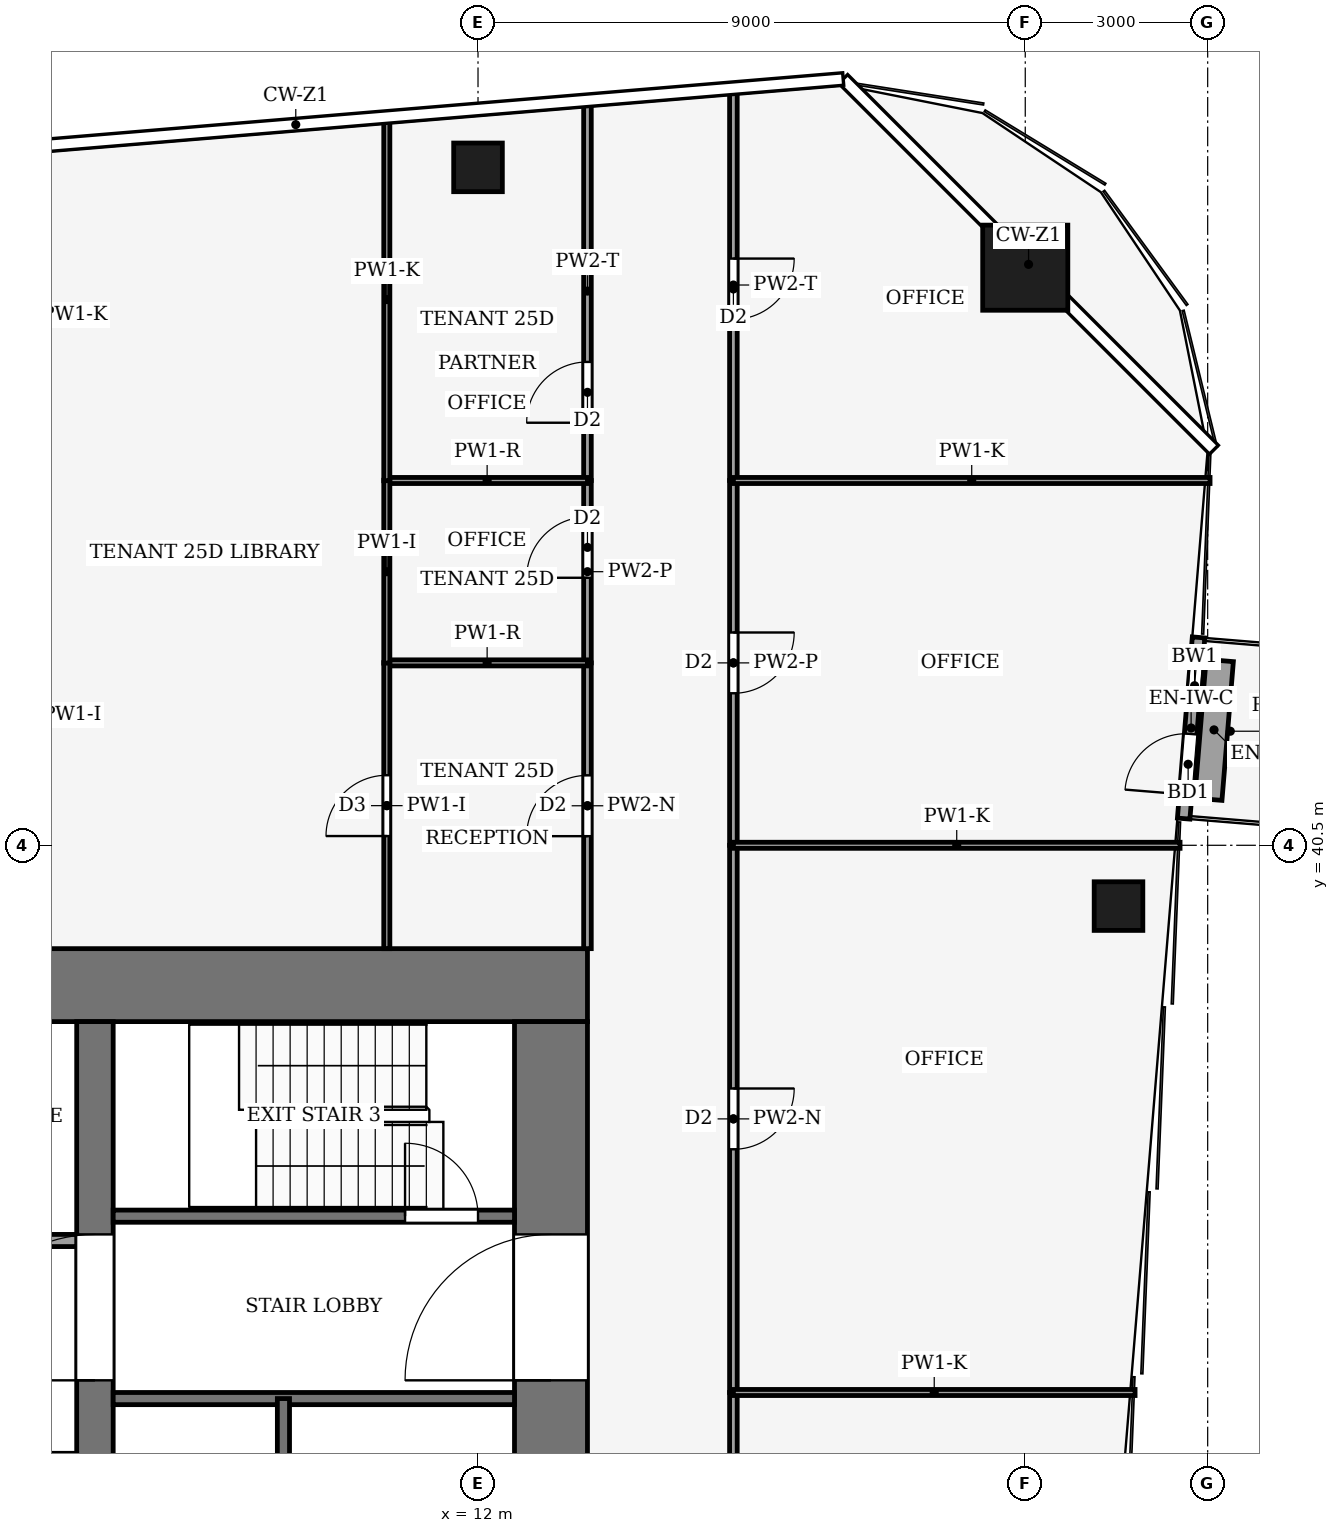
"""IFC4 building model, lengths in metres.
Left out: names, types, materials, properties, quantities, classifications, styles, units other than length and angle.
Written with IfcOpenShell. Run it as: python <this file> out.ifc"""

import sys

from ifc_helpers import new_model, si_unit, direction, frame, frame_2d, origin, origin_2d, place, context, subcontext, project, spatial, rectangle, hollow_rectangle, extrude, element, fill, save


model = new_model("IFC4")
c1 = context("Model", 3, precision=1e-05, world=origin(), true_north=direction((0.0, 1.0)))
c2 = subcontext(c1, "Body", "Model", "MODEL_VIEW")
j1 = project(units=[si_unit("LENGTHUNIT", "METRE"), si_unit("PLANEANGLEUNIT", "RADIAN")], contexts=[c1])
p1 = place(None, origin())
s1 = spatial("IfcSite", under=j1, at=p1, CompositionType="ELEMENT")
p2 = place(p1, origin())
s2 = spatial("IfcBuilding", under=s1, at=p2, CompositionType="ELEMENT")
p3 = place(p2, frame((0.0, 0.0, 110.0)))
s3 = spatial("IfcBuildingStorey", under=s2, at=p3, CompositionType="ELEMENT", Elevation=110.0)
p4 = place(p3, frame((-13.8, 38.2, -0.13), z_axis=(0.0, 0.0, 1.0), x_axis=(1.0, 0.0, 0.0)))
e1 = element("IfcWall", 1, at=p4, inside=s3, PredefinedType="SHEAR", context=c2, shape_type="SweptSolid", body=[
    extrude(rectangle(XDim=27.6, YDim=1.2, at=frame_2d((13.8, 0.0))), origin(), (0.0, 0.0, 1.0), 3.88),
])
p5 = place(p3, frame((13.2, 18.4, -0.13), z_axis=(0.0, 0.0, 1.0), x_axis=(0.0, 1.0, 0.0)))
e2 = element("IfcWall", 2, at=p5, inside=s3, PredefinedType="SHEAR", context=c2, shape_type="SweptSolid", body=[
    extrude(rectangle(XDim=19.2, YDim=1.2, at=frame_2d((9.6, 0.0))), origin(), (0.0, 0.0, 1.0), 3.88),
])
p6 = place(p5, frame((2.8, 0.0, 0.13)))
e3 = element("IfcOpeningElement", 3, at=p6, cuts=e2, PredefinedType="OPENING", context=c2, shape_type="SweptSolid", body=[
    extrude(rectangle(XDim=2.4, YDim=2.4, at=frame_2d((1.2, 1.2))), frame((0.0, 0.61, 0.0), z_axis=(0.0, -1.0, 0.0), x_axis=(1.0, 0.0, 0.0)), (0.0, 0.0, 1.0), 1.22),
])
p7 = place(p5, frame((13.3, 0.0, 0.13)))
e4 = element("IfcOpeningElement", 4, at=p7, cuts=e2, PredefinedType="OPENING", context=c2, shape_type="SweptSolid", body=[
    extrude(rectangle(XDim=2.4, YDim=2.4, at=frame_2d((1.2, 1.2))), frame((0.0, 0.61, 0.0), z_axis=(0.0, -1.0, 0.0), x_axis=(1.0, 0.0, 0.0)), (0.0, 0.0, 1.0), 1.22),
])
p8 = place(p3, frame((5.7, 18.4, -0.13), z_axis=(0.0, 0.0, 1.0), x_axis=(0.0, 1.0, 0.0)))
e5 = element("IfcWall", 5, at=p8, inside=s3, PredefinedType="SHEAR", context=c2, shape_type="SweptSolid", body=[
    extrude(rectangle(XDim=19.2, YDim=0.6, at=frame_2d((9.6, 0.0))), origin(), (0.0, 0.0, 1.0), 3.88),
])
p9 = place(p8, frame((8.35, 0.0, 0.13)))
e6 = element("IfcOpeningElement", 6, at=p9, cuts=e5, PredefinedType="OPENING", context=c2, shape_type="SweptSolid", body=[
    extrude(rectangle(XDim=0.9, YDim=2.1, at=frame_2d((0.45, 1.05))), frame((0.0, 0.31, 0.0), z_axis=(0.0, -1.0, 0.0), x_axis=(1.0, 0.0, 0.0)), (0.0, 0.0, 1.0), 0.62),
])
p10 = place(p8, frame((13.3, 0.0, 0.13)))
e7 = element("IfcOpeningElement", 7, at=p10, cuts=e5, PredefinedType="OPENING", context=c2, shape_type="SweptSolid", body=[
    extrude(rectangle(XDim=2.4, YDim=2.4, at=frame_2d((1.2, 1.2))), frame((0.0, 0.31, 0.0), z_axis=(0.0, -1.0, 0.0), x_axis=(1.0, 0.0, 0.0)), (0.0, 0.0, 1.0), 0.62),
])
p11 = place(p3, frame((21.0, 50.0, 0.0), z_axis=(0.0, 0.0, 1.0), x_axis=(1.0, 0.0, 0.0)))
e8 = element("IfcColumn", 8, at=p11, inside=s3, PredefinedType="COLUMN", context=c2, shape_type="SweptSolid", body=[
    extrude(hollow_rectangle(XDim=1.4, YDim=1.4, WallThickness=0.08, at=origin_2d()), origin(), (0.0, 0.0, 1.0), 4.0),
])
for number, where, z_axis, x_axis in (
    (9, (12.0, 51.65, 0.0), (0.0, 0.0, 1.0), (1.0, 0.0, 0.0)),
    (10, (22.534, 39.5, 0.0), (0.0, 0.0, 1.0), (1.0, 0.0, 0.0)),
):
    element("IfcColumn", number, at=place(p3, frame(where, z_axis=z_axis, x_axis=x_axis)), inside=s3, PredefinedType="COLUMN", context=c2, shape_type="SweptSolid", body=[
        extrude(hollow_rectangle(XDim=0.8, YDim=0.8, WallThickness=0.04, at=origin_2d()), origin(), (0.0, 0.0, 1.0), 4.0),
    ])
p12 = place(p3, frame((23.605, 40.939, 0.0), z_axis=(0.0, 0.0, 1.0), x_axis=(0.081903334605, 0.996640278024, 0.0)))
e11 = element("IfcWall", 11, at=p12, inside=s3, PredefinedType="SOLIDWALL", context=c2, shape_type="SweptSolid", body=[
    extrude(rectangle(XDim=2.99, YDim=0.206, at=frame_2d((1.495, 0.0))), origin(), (0.0, 0.0, 1.0), 3.65),
])
p13 = place(p12, frame((0.396, 0.0, 0.0)))
e12 = element("IfcOpeningElement", 12, at=p13, cuts=e11, PredefinedType="OPENING", context=c2, shape_type="SweptSolid", body=[
    extrude(rectangle(XDim=1.0, YDim=2.1, at=frame_2d((0.5, 1.05))), frame((0.0, 0.113, 0.0), z_axis=(0.0, -1.0, 0.0), x_axis=(1.0, 0.0, 0.0)), (0.0, 0.0, 1.0), 0.226),
])
p14 = place(p12, frame((1.793, 0.0, 0.9)))
e13 = element("IfcOpeningElement", 13, at=p14, cuts=e11, PredefinedType="OPENING", context=c2, shape_type="SweptSolid", body=[
    extrude(rectangle(XDim=0.8, YDim=1.2, at=frame_2d((0.4, 0.6))), frame((0.0, 0.113, 0.0), z_axis=(0.0, -1.0, 0.0), x_axis=(1.0, 0.0, 0.0)), (0.0, 0.0, 1.0), 0.226),
])
p15 = place(p3, frame((24.01, 41.257, 0.0), z_axis=(0.0, 0.0, 1.0), x_axis=(0.081986639556, 0.996633428566, 0.0)))
e14 = element("IfcWall", 14, at=p15, inside=s3, PredefinedType="USERDEFINED", context=c2, shape_type="SweptSolid", body=[
    extrude(rectangle(XDim=2.29, YDim=0.45, at=frame_2d((1.145, 0.0))), origin(), (0.0, 0.0, 1.0), 0.4),
])
p16 = place(p3, frame((6.0, 31.4, 0.0), z_axis=(0.0, 0.0, 1.0), x_axis=(1.0, 0.0, 0.0)))
e15 = element("IfcWall", 15, at=p16, inside=s3, PredefinedType="PARTITIONING", context=c2, shape_type="SweptSolid", body=[
    extrude(rectangle(XDim=6.6, YDim=0.2, at=frame_2d((3.3, 0.0))), origin(), (0.0, 0.0, 1.0), 3.75),
])
p17 = place(p3, frame((-5.4, 34.0, 0.0), z_axis=(0.0, 0.0, 1.0), x_axis=(1.0, 0.0, 0.0)))
e16 = element("IfcWall", 16, at=p17, inside=s3, PredefinedType="PARTITIONING", context=c2, shape_type="SweptSolid", body=[
    extrude(rectangle(XDim=10.8, YDim=0.2, at=frame_2d((5.4, 0.0))), origin(), (0.0, 0.0, 1.0), 3.75),
])
p18 = place(p17, frame((6.15, 0.0, 0.0)))
e17 = element("IfcOpeningElement", 17, at=p18, cuts=e16, PredefinedType="OPENING", context=c2, shape_type="SweptSolid", body=[
    extrude(rectangle(XDim=1.2, YDim=2.2, at=frame_2d((0.6, 1.1))), frame((0.0, 0.11, 0.0), z_axis=(0.0, -1.0, 0.0), x_axis=(1.0, 0.0, 0.0)), (0.0, 0.0, 1.0), 0.22),
])
p19 = place(p17, frame((8.95, 0.0, 0.0)))
e18 = element("IfcOpeningElement", 18, at=p19, cuts=e16, PredefinedType="OPENING", context=c2, shape_type="SweptSolid", body=[
    extrude(rectangle(XDim=1.0, YDim=2.1, at=frame_2d((0.5, 1.05))), frame((0.0, 0.11, 0.0), z_axis=(0.0, -1.0, 0.0), x_axis=(1.0, 0.0, 0.0)), (0.0, 0.0, 1.0), 0.22),
])
p20 = place(p3, frame((6.0, 34.4, 0.0), z_axis=(0.0, 0.0, 1.0), x_axis=(1.0, 0.0, 0.0)))
e19 = element("IfcWall", 19, at=p20, inside=s3, PredefinedType="PARTITIONING", context=c2, shape_type="SweptSolid", body=[
    extrude(rectangle(XDim=6.6, YDim=0.2, at=frame_2d((3.3, 0.0))), origin(), (0.0, 0.0, 1.0), 3.75),
])
p21 = place(p20, frame((4.8, 0.0, 0.0)))
e20 = element("IfcOpeningElement", 20, at=p21, cuts=e19, PredefinedType="OPENING", context=c2, shape_type="SweptSolid", body=[
    extrude(rectangle(XDim=1.2, YDim=2.2, at=frame_2d((0.6, 1.1))), frame((0.0, 0.11, 0.0), z_axis=(0.0, -1.0, 0.0), x_axis=(1.0, 0.0, 0.0)), (0.0, 0.0, 1.0), 0.22),
])
p22 = place(p3, frame((8.8, 24.0, 0.0), z_axis=(0.0, 0.0, 1.0), x_axis=(0.0, 1.0, 0.0)))
e21 = element("IfcWall", 21, at=p22, inside=s3, PredefinedType="PARTITIONING", context=c2, shape_type="SweptSolid", body=[
    extrude(rectangle(XDim=7.4, YDim=0.2, at=frame_2d((3.7, 0.0))), origin(), (0.0, 0.0, 1.0), 3.75),
])
p23 = place(p3, frame((16.2, 31.5, 0.0), z_axis=(0.0, 0.0, 1.0), x_axis=(0.0, -1.0, 0.0)))
e22 = element("IfcWall", 22, at=p23, inside=s3, PredefinedType="PARTITIONING", context=c2, shape_type="SweptSolid", body=[
    extrude(rectangle(XDim=9.0, YDim=0.125, at=frame_2d((4.5, 0.0))), origin(), (0.0, 0.0, 1.0), 3.36),
])
p24 = place(p23, frame((4.0, 0.0, 0.0)))
e23 = element("IfcOpeningElement", 23, at=p24, cuts=e22, PredefinedType="OPENING", context=c2, shape_type="SweptSolid", body=[
    extrude(rectangle(XDim=1.0, YDim=2.1, at=frame_2d((0.5, 1.05))), frame((0.0, 0.073, 0.0), z_axis=(0.0, -1.0, 0.0), x_axis=(1.0, 0.0, 0.0)), (0.0, 0.0, 1.0), 0.145),
])
p25 = place(p3, frame((16.2, 40.5, 0.0), z_axis=(0.0, 0.0, 1.0), x_axis=(0.0, -1.0, 0.0)))
e24 = element("IfcWall", 24, at=p25, inside=s3, PredefinedType="PARTITIONING", context=c2, shape_type="SweptSolid", body=[
    extrude(rectangle(XDim=9.0, YDim=0.125, at=frame_2d((4.5, 0.0))), origin(), (0.0, 0.0, 1.0), 3.02),
])
p26 = place(p25, frame((4.0, 0.0, 0.0)))
e25 = element("IfcOpeningElement", 25, at=p26, cuts=e24, PredefinedType="OPENING", context=c2, shape_type="SweptSolid", body=[
    extrude(rectangle(XDim=1.0, YDim=2.1, at=frame_2d((0.5, 1.05))), frame((0.0, 0.073, 0.0), z_axis=(0.0, -1.0, 0.0), x_axis=(1.0, 0.0, 0.0)), (0.0, 0.0, 1.0), 0.145),
])
p27 = place(p3, frame((16.2, 46.5, 0.0), z_axis=(0.0, 0.0, 1.0), x_axis=(0.0, -1.0, 0.0)))
e26 = element("IfcWall", 26, at=p27, inside=s3, PredefinedType="PARTITIONING", context=c2, shape_type="SweptSolid", body=[
    extrude(rectangle(XDim=6.0, YDim=0.125, at=frame_2d((3.0, 0.0))), origin(), (0.0, 0.0, 1.0), 3.75),
])
p28 = place(p27, frame((2.5, 0.0, 0.0)))
e27 = element("IfcOpeningElement", 27, at=p28, cuts=e26, PredefinedType="OPENING", context=c2, shape_type="SweptSolid", body=[
    extrude(rectangle(XDim=1.0, YDim=2.1, at=frame_2d((0.5, 1.05))), frame((0.0, 0.073, 0.0), z_axis=(0.0, -1.0, 0.0), x_axis=(1.0, 0.0, 0.0)), (0.0, 0.0, 1.0), 0.145),
])
p29 = place(p3, frame((16.2, 52.93, 0.0), z_axis=(0.0, 0.0, 1.0), x_axis=(0.0, -1.0, 0.0)))
e28 = element("IfcWall", 28, at=p29, inside=s3, PredefinedType="PARTITIONING", context=c2, shape_type="SweptSolid", body=[
    extrude(rectangle(XDim=6.43, YDim=0.125, at=frame_2d((3.215, 0.0))), origin(), (0.0, 0.0, 1.0), 2.92),
])
p30 = place(p29, frame((2.78, 0.0, 0.0)))
e29 = element("IfcOpeningElement", 29, at=p30, cuts=e28, PredefinedType="OPENING", context=c2, shape_type="SweptSolid", body=[
    extrude(rectangle(XDim=1.0, YDim=2.1, at=frame_2d((0.5, 1.05))), frame((0.0, 0.073, 0.0), z_axis=(0.0, -1.0, 0.0), x_axis=(1.0, 0.0, 0.0)), (0.0, 0.0, 1.0), 0.145),
])
p31 = place(p3, frame((13.8, 38.8, 0.0), z_axis=(0.0, 0.0, 1.0), x_axis=(0.0, 1.0, 0.0)))
e30 = element("IfcWall", 30, at=p31, inside=s3, PredefinedType="PARTITIONING", context=c2, shape_type="SweptSolid", body=[
    extrude(rectangle(XDim=4.7, YDim=0.125, at=frame_2d((2.35, 0.0))), origin(), (0.0, 0.0, 1.0), 3.02),
])
p32 = place(p31, frame((1.85, 0.0, 0.0)))
e31 = element("IfcOpeningElement", 31, at=p32, cuts=e30, PredefinedType="OPENING", context=c2, shape_type="SweptSolid", body=[
    extrude(rectangle(XDim=1.0, YDim=2.1, at=frame_2d((0.5, 1.05))), frame((0.0, 0.073, 0.0), z_axis=(0.0, -1.0, 0.0), x_axis=(1.0, 0.0, 0.0)), (0.0, 0.0, 1.0), 0.145),
])
p33 = place(p3, frame((13.8, 43.5, 0.0), z_axis=(0.0, 0.0, 1.0), x_axis=(0.0, 1.0, 0.0)))
e32 = element("IfcWall", 32, at=p33, inside=s3, PredefinedType="PARTITIONING", context=c2, shape_type="SweptSolid", body=[
    extrude(rectangle(XDim=3.0, YDim=0.125, at=frame_2d((1.5, 0.0))), origin(), (0.0, 0.0, 1.0), 3.75),
])
p34 = place(p33, frame((1.4, 0.0, 0.0)))
e33 = element("IfcOpeningElement", 33, at=p34, cuts=e32, PredefinedType="OPENING", context=c2, shape_type="SweptSolid", body=[
    extrude(rectangle(XDim=1.0, YDim=2.1, at=frame_2d((0.5, 1.05))), frame((0.0, 0.073, 0.0), z_axis=(0.0, -1.0, 0.0), x_axis=(1.0, 0.0, 0.0)), (0.0, 0.0, 1.0), 0.145),
])
p35 = place(p3, frame((13.8, 46.5, 0.0), z_axis=(0.0, 0.0, 1.0), x_axis=(0.0, 1.0, 0.0)))
e34 = element("IfcWall", 34, at=p35, inside=s3, PredefinedType="PARTITIONING", context=c2, shape_type="SweptSolid", body=[
    extrude(rectangle(XDim=6.23, YDim=0.125, at=frame_2d((3.115, 0.0))), origin(), (0.0, 0.0, 1.0), 2.92),
])
p36 = place(p35, frame((0.95, 0.0, 0.0)))
e35 = element("IfcOpeningElement", 35, at=p36, cuts=e34, PredefinedType="OPENING", context=c2, shape_type="SweptSolid", body=[
    extrude(rectangle(XDim=1.0, YDim=2.1, at=frame_2d((0.5, 1.05))), frame((0.0, 0.073, 0.0), z_axis=(0.0, -1.0, 0.0), x_axis=(1.0, 0.0, 0.0)), (0.0, 0.0, 1.0), 0.145),
])
p37 = place(p3, frame((22.806, 31.5, 0.0), z_axis=(0.0, 0.0, 1.0), x_axis=(-1.0, 0.0, 0.0)))
e36 = element("IfcWall", 36, at=p37, inside=s3, PredefinedType="PARTITIONING", context=c2, shape_type="SweptSolid", body=[
    extrude(rectangle(XDim=6.606, YDim=0.1, at=frame_2d((3.303, 0.0))), origin(), (0.0, 0.0, 1.0), 2.92),
])
p38 = place(p3, frame((23.546, 40.5, 0.0), z_axis=(0.0, 0.0, 1.0), x_axis=(-1.0, 0.0, 0.0)))
e37 = element("IfcWall", 37, at=p38, inside=s3, PredefinedType="PARTITIONING", context=c2, shape_type="SweptSolid", body=[
    extrude(rectangle(XDim=7.346, YDim=0.1, at=frame_2d((3.673, 0.0))), origin(), (0.0, 0.0, 1.0), 2.92),
])
p39 = place(p3, frame((24.039, 46.5, 0.0), z_axis=(0.0, 0.0, 1.0), x_axis=(-1.0, 0.0, 0.0)))
e38 = element("IfcWall", 38, at=p39, inside=s3, PredefinedType="PARTITIONING", context=c2, shape_type="SweptSolid", body=[
    extrude(rectangle(XDim=7.839, YDim=0.1, at=frame_2d((3.919, 0.0))), origin(), (0.0, 0.0, 1.0), 2.92),
])
p40 = place(p3, frame((13.8, 43.5, 0.0), z_axis=(0.0, 0.0, 1.0), x_axis=(-1.0, 0.0, 0.0)))
e39 = element("IfcWall", 39, at=p40, inside=s3, PredefinedType="PARTITIONING", context=c2, shape_type="SweptSolid", body=[
    extrude(rectangle(XDim=3.3, YDim=0.1, at=frame_2d((1.65, 0.0))), origin(), (0.0, 0.0, 1.0), 3.27),
])
p41 = place(p3, frame((10.5, 38.8, 0.0), z_axis=(0.0, 0.0, 1.0), x_axis=(0.0, 1.0, 0.0)))
e40 = element("IfcWall", 40, at=p41, inside=s3, PredefinedType="PARTITIONING", context=c2, shape_type="SweptSolid", body=[
    extrude(rectangle(XDim=4.704, YDim=0.1, at=frame_2d((2.352, 0.0))), origin(), (0.0, 0.0, 1.0), 3.75),
])
p42 = place(p41, frame((1.852, 0.0, 0.0)))
e41 = element("IfcOpeningElement", 41, at=p42, cuts=e40, PredefinedType="OPENING", context=c2, shape_type="SweptSolid", body=[
    extrude(rectangle(XDim=1.0, YDim=2.1, at=frame_2d((0.5, 1.05))), frame((0.0, 0.06, 0.0), z_axis=(0.0, -1.0, 0.0), x_axis=(1.0, 0.0, 0.0)), (0.0, 0.0, 1.0), 0.12),
])
p43 = place(p3, frame((13.8, 46.5, 0.0), z_axis=(0.0, 0.0, 1.0), x_axis=(-1.0, 0.0, 0.0)))
e42 = element("IfcWall", 42, at=p43, inside=s3, PredefinedType="PARTITIONING", context=c2, shape_type="SweptSolid", body=[
    extrude(rectangle(XDim=3.3, YDim=0.1, at=frame_2d((1.65, 0.0))), origin(), (0.0, 0.0, 1.0), 3.27),
])
p44 = place(p3, frame((10.5, 46.504, 0.0), z_axis=(0.0, 0.0, 1.0), x_axis=(0.0, -1.0, 0.0)))
e43 = element("IfcWall", 43, at=p44, inside=s3, PredefinedType="PARTITIONING", context=c2, shape_type="SweptSolid", body=[
    extrude(rectangle(XDim=3.008, YDim=0.1, at=frame_2d((1.504, 0.0))), origin(), (0.0, 0.0, 1.0), 3.75),
])
p45 = place(p3, frame((10.5, 52.455, 0.0), z_axis=(0.0, 0.0, 1.0), x_axis=(0.0, -1.0, 0.0)))
e44 = element("IfcWall", 44, at=p45, inside=s3, PredefinedType="PARTITIONING", context=c2, shape_type="SweptSolid", body=[
    extrude(rectangle(XDim=5.959, YDim=0.1, at=frame_2d((2.979, 0.0))), origin(), (0.0, 0.0, 1.0), 2.92),
])
p46 = place(p13, origin())
e45 = element("IfcDoor", 45, at=p46, inside=s3, OperationType="SINGLE_SWING_LEFT", PredefinedType="DOOR", context=c2, shape_type="SweptSolid", body=[
    extrude(rectangle(XDim=1.0, YDim=2.1, at=frame_2d((0.5, 1.05))), frame((0.0, 0.025, 0.0), z_axis=(0.0, -1.0, 0.0), x_axis=(1.0, 0.0, 0.0)), (0.0, 0.0, 1.0), 0.05),
])
fill(e12, e45)
p47 = place(p14, origin())
e46 = element("IfcWindow", 46, at=p47, inside=s3, PartitioningType="SINGLE_PANEL", PredefinedType="WINDOW", context=c2, shape_type="SweptSolid", body=[
    extrude(rectangle(XDim=0.8, YDim=1.2, at=frame_2d((0.4, 0.6))), frame((0.0, 0.03, 0.0), z_axis=(0.0, -1.0, 0.0), x_axis=(1.0, 0.0, 0.0)), (0.0, 0.0, 1.0), 0.06),
])
fill(e13, e46)
p48 = place(p21, origin())
e47 = element("IfcDoor", 47, at=p48, inside=s3, OperationType="SINGLE_SWING_RIGHT", PredefinedType="DOOR", context=c2, shape_type="SweptSolid", body=[
    extrude(rectangle(XDim=1.2, YDim=2.2, at=frame_2d((0.6, 1.1))), frame((0.0, 0.025, 0.0), z_axis=(0.0, -1.0, 0.0), x_axis=(1.0, 0.0, 0.0)), (0.0, 0.0, 1.0), 0.05),
])
fill(e20, e47)
p49 = place(p10, origin())
e48 = element("IfcDoor", 48, at=p49, inside=s3, OperationType="DOUBLE_DOOR_SINGLE_SWING", PredefinedType="DOOR", context=c2, shape_type="SweptSolid", body=[
    extrude(rectangle(XDim=2.4, YDim=2.4, at=frame_2d((1.2, 1.2))), frame((0.0, 0.025, 0.0), z_axis=(0.0, -1.0, 0.0), x_axis=(1.0, 0.0, 0.0)), (0.0, 0.0, 1.0), 0.05),
])
fill(e7, e48)
p50 = place(p7, origin())
e49 = element("IfcDoor", 49, at=p50, inside=s3, OperationType="DOUBLE_DOOR_SINGLE_SWING", PredefinedType="DOOR", context=c2, shape_type="SweptSolid", body=[
    extrude(rectangle(XDim=2.4, YDim=2.4, at=frame_2d((1.2, 1.2))), frame((0.0, 0.025, 0.0), z_axis=(0.0, -1.0, 0.0), x_axis=(1.0, 0.0, 0.0)), (0.0, 0.0, 1.0), 0.05),
])
fill(e4, e49)
p51 = place(p26, origin())
e50 = element("IfcDoor", 50, at=p51, inside=s3, OperationType="SINGLE_SWING_LEFT", PredefinedType="DOOR", context=c2, shape_type="SweptSolid", body=[
    extrude(rectangle(XDim=1.0, YDim=2.1, at=frame_2d((0.5, 1.05))), frame((0.0, 0.025, 0.0), z_axis=(0.0, -1.0, 0.0), x_axis=(1.0, 0.0, 0.0)), (0.0, 0.0, 1.0), 0.05),
])
fill(e25, e50)
p52 = place(p28, origin())
e51 = element("IfcDoor", 51, at=p52, inside=s3, OperationType="SINGLE_SWING_RIGHT", PredefinedType="DOOR", context=c2, shape_type="SweptSolid", body=[
    extrude(rectangle(XDim=1.0, YDim=2.1, at=frame_2d((0.5, 1.05))), frame((0.0, 0.025, 0.0), z_axis=(0.0, -1.0, 0.0), x_axis=(1.0, 0.0, 0.0)), (0.0, 0.0, 1.0), 0.05),
])
fill(e27, e51)
p53 = place(p30, origin())
e52 = element("IfcDoor", 52, at=p53, inside=s3, OperationType="SINGLE_SWING_RIGHT", PredefinedType="DOOR", context=c2, shape_type="SweptSolid", body=[
    extrude(rectangle(XDim=1.0, YDim=2.1, at=frame_2d((0.5, 1.05))), frame((0.0, 0.025, 0.0), z_axis=(0.0, -1.0, 0.0), x_axis=(1.0, 0.0, 0.0)), (0.0, 0.0, 1.0), 0.05),
])
fill(e29, e52)
p54 = place(p32, origin())
e53 = element("IfcDoor", 53, at=p54, inside=s3, OperationType="SINGLE_SWING_LEFT", PredefinedType="DOOR", context=c2, shape_type="SweptSolid", body=[
    extrude(rectangle(XDim=1.0, YDim=2.1, at=frame_2d((0.5, 1.05))), frame((0.0, 0.025, 0.0), z_axis=(0.0, -1.0, 0.0), x_axis=(1.0, 0.0, 0.0)), (0.0, 0.0, 1.0), 0.05),
])
fill(e31, e53)
p55 = place(p34, origin())
e54 = element("IfcDoor", 54, at=p55, inside=s3, OperationType="SINGLE_SWING_RIGHT", PredefinedType="DOOR", context=c2, shape_type="SweptSolid", body=[
    extrude(rectangle(XDim=1.0, YDim=2.1, at=frame_2d((0.5, 1.05))), frame((0.0, 0.025, 0.0), z_axis=(0.0, -1.0, 0.0), x_axis=(1.0, 0.0, 0.0)), (0.0, 0.0, 1.0), 0.05),
])
fill(e33, e54)
p56 = place(p36, origin())
e55 = element("IfcDoor", 55, at=p56, inside=s3, OperationType="SINGLE_SWING_LEFT", PredefinedType="DOOR", context=c2, shape_type="SweptSolid", body=[
    extrude(rectangle(XDim=1.0, YDim=2.1, at=frame_2d((0.5, 1.05))), frame((0.0, 0.025, 0.0), z_axis=(0.0, -1.0, 0.0), x_axis=(1.0, 0.0, 0.0)), (0.0, 0.0, 1.0), 0.05),
])
fill(e35, e55)
p57 = place(p42, origin())
e56 = element("IfcDoor", 56, at=p57, inside=s3, OperationType="SINGLE_SWING_RIGHT", PredefinedType="DOOR", context=c2, shape_type="SweptSolid", body=[
    extrude(rectangle(XDim=1.0, YDim=2.1, at=frame_2d((0.5, 1.05))), frame((0.0, 0.025, 0.0), z_axis=(0.0, -1.0, 0.0), x_axis=(1.0, 0.0, 0.0)), (0.0, 0.0, 1.0), 0.05),
])
fill(e41, e56)
save(model, sys.argv[1])
